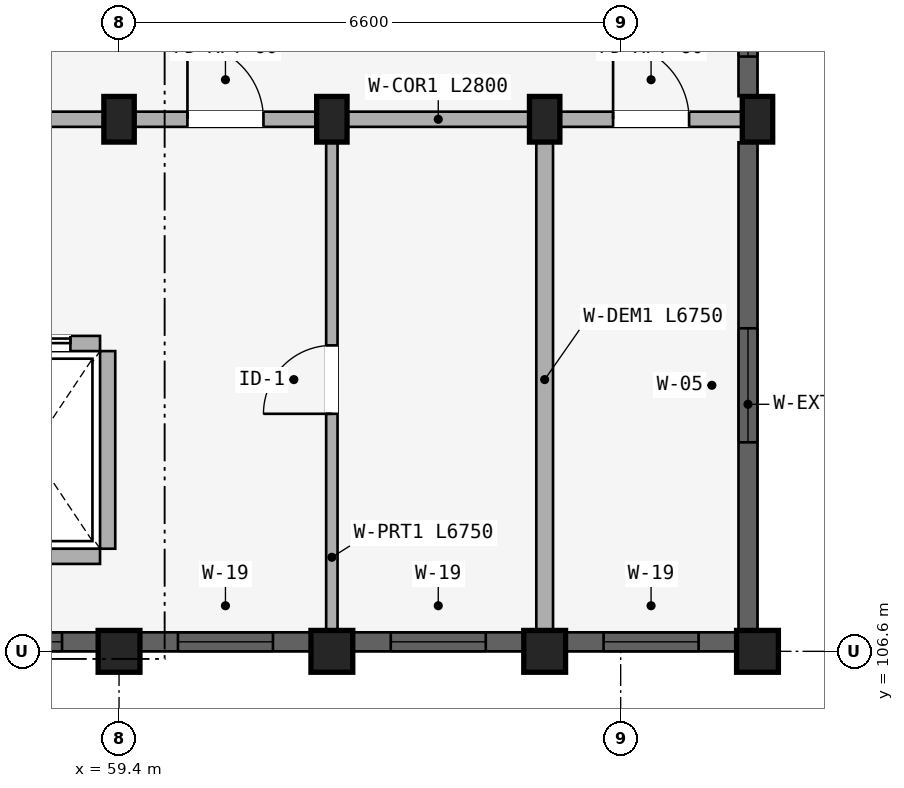
"""IFC4 building model, lengths in metres.
Left out: names, types, materials, properties, quantities, classifications, styles, units other than length and angle.
Written with IfcOpenShell. Run it as: python <this file> out.ifc"""

import sys

from ifc_helpers import new_model, si_unit, direction, frame, frame_2d, origin, origin_2d, place, context, subcontext, project, spatial, rectangle, extrude, element, fill, save


model = new_model("IFC4")
c1 = context("Model", 3, precision=1e-05, world=origin(), true_north=direction((0.0, 1.0)))
c2 = subcontext(c1, "Body", "Model", "MODEL_VIEW")
j1 = project(units=[si_unit("LENGTHUNIT", "METRE"), si_unit("PLANEANGLEUNIT", "RADIAN")], contexts=[c1])
p1 = place(None, origin())
s1 = spatial("IfcSite", under=j1, at=p1, CompositionType="ELEMENT")
p2 = place(p1, origin())
s2 = spatial("IfcBuilding", under=s1, at=p2, CompositionType="ELEMENT")
p3 = place(p2, frame((0.0, 0.0, 49.65)))
s3 = spatial("IfcBuildingStorey", under=s2, at=p3, CompositionType="ELEMENT", Elevation=49.65)
p4 = place(p3, frame((59.4, 106.6, 0.0), z_axis=(0.0, 0.0, 1.0), x_axis=(1.0, 0.0, 0.0)))
e1 = element("IfcColumn", 1, at=p4, inside=s3, PredefinedType="COLUMN", context=c2, shape_type="SweptSolid", body=[
    extrude(rectangle(XDim=0.55, YDim=0.55, at=origin_2d()), origin(), (0.0, 0.0, 1.0), 2.91),
])
p5 = place(p3, frame((59.4, 113.6, 0.0), z_axis=(0.0, 0.0, 1.0), x_axis=(1.0, 0.0, 0.0)))
e2 = element("IfcColumn", 2, at=p5, inside=s3, PredefinedType="COLUMN", context=c2, shape_type="SweptSolid", body=[
    extrude(rectangle(XDim=0.4, YDim=0.6, at=origin_2d()), origin(), (0.0, 0.0, 1.0), 2.91),
])
p6 = place(p3, frame((62.2, 106.6, 0.0), z_axis=(0.0, 0.0, 1.0), x_axis=(1.0, 0.0, 0.0)))
e3 = element("IfcColumn", 3, at=p6, inside=s3, PredefinedType="COLUMN", context=c2, shape_type="SweptSolid", body=[
    extrude(rectangle(XDim=0.55, YDim=0.55, at=origin_2d()), origin(), (0.0, 0.0, 1.0), 2.91),
])
p7 = place(p3, frame((62.2, 113.6, 0.0), z_axis=(0.0, 0.0, 1.0), x_axis=(1.0, 0.0, 0.0)))
e4 = element("IfcColumn", 4, at=p7, inside=s3, PredefinedType="COLUMN", context=c2, shape_type="SweptSolid", body=[
    extrude(rectangle(XDim=0.4, YDim=0.6, at=origin_2d()), origin(), (0.0, 0.0, 1.0), 2.91),
])
p8 = place(p3, frame((65.0, 106.6, 0.0), z_axis=(0.0, 0.0, 1.0), x_axis=(1.0, 0.0, 0.0)))
e5 = element("IfcColumn", 5, at=p8, inside=s3, PredefinedType="COLUMN", context=c2, shape_type="SweptSolid", body=[
    extrude(rectangle(XDim=0.55, YDim=0.55, at=origin_2d()), origin(), (0.0, 0.0, 1.0), 2.91),
])
p9 = place(p3, frame((65.0, 113.6, 0.0), z_axis=(0.0, 0.0, 1.0), x_axis=(1.0, 0.0, 0.0)))
e6 = element("IfcColumn", 6, at=p9, inside=s3, PredefinedType="COLUMN", context=c2, shape_type="SweptSolid", body=[
    extrude(rectangle(XDim=0.4, YDim=0.6, at=origin_2d()), origin(), (0.0, 0.0, 1.0), 2.91),
])
p10 = place(p3, frame((67.8, 106.6, 0.0), z_axis=(0.0, 0.0, 1.0), x_axis=(1.0, 0.0, 0.0)))
e7 = element("IfcColumn", 7, at=p10, inside=s3, PredefinedType="COLUMN", context=c2, shape_type="SweptSolid", body=[
    extrude(rectangle(XDim=0.55, YDim=0.55, at=origin_2d()), origin(), (0.0, 0.0, 1.0), 2.91),
])
p11 = place(p3, frame((67.8, 113.6, 0.0), z_axis=(0.0, 0.0, 1.0), x_axis=(1.0, 0.0, 0.0)))
e8 = element("IfcColumn", 8, at=p11, inside=s3, PredefinedType="COLUMN", context=c2, shape_type="SweptSolid", body=[
    extrude(rectangle(XDim=0.4, YDim=0.6, at=origin_2d()), origin(), (0.0, 0.0, 1.0), 2.91),
])
p12 = place(p3, frame((59.25, 107.95, 0.0), z_axis=(0.0, 0.0, 1.0), x_axis=(0.0, 1.0, 0.0)))
e9 = element("IfcWall", 9, at=p12, inside=s3, PredefinedType="STANDARD", context=c2, shape_type="SweptSolid", body=[
    extrude(rectangle(XDim=2.6, YDim=0.2, at=frame_2d((1.3, 0.0))), origin(), (0.0, 0.0, 1.0), 2.352),
])
p13 = place(p3, frame((57.35, 107.85, 0.0), z_axis=(0.0, 0.0, 1.0), x_axis=(1.0, 0.0, 0.0)))
e10 = element("IfcWall", 10, at=p13, inside=s3, PredefinedType="STANDARD", context=c2, shape_type="SweptSolid", body=[
    extrude(rectangle(XDim=1.8, YDim=0.2, at=frame_2d((0.9, 0.0))), origin(), (0.0, 0.0, 1.0), 2.91),
])
p14 = place(p3, frame((57.35, 110.65, 0.0), z_axis=(0.0, 0.0, 1.0), x_axis=(1.0, 0.0, 0.0)))
e11 = element("IfcWall", 11, at=p14, inside=s3, PredefinedType="STANDARD", context=c2, shape_type="SweptSolid", body=[
    extrude(rectangle(XDim=1.8, YDim=0.2, at=frame_2d((0.9, 0.0))), origin(), (0.0, 0.0, 1.0), 2.91),
])
p15 = place(p14, frame((0.39, 0.0, 0.0)))
e12 = element("IfcOpeningElement", 12, at=p15, cuts=e11, PredefinedType="OPENING", context=c2, shape_type="SweptSolid", body=[
    extrude(rectangle(XDim=1.02, YDim=2.15, at=frame_2d((0.51, 1.075))), frame((0.0, 0.11, 0.0), z_axis=(0.0, -1.0, 0.0), x_axis=(1.0, 0.0, 0.0)), (0.0, 0.0, 1.0), 0.22),
])
p16 = place(p3, frame((53.75, 113.6, 0.0), z_axis=(0.0, 0.0, 1.0), x_axis=(1.0, 0.0, 0.0)))
e13 = element("IfcWall", 13, at=p16, inside=s3, PredefinedType="STANDARD", context=c2, shape_type="SweptSolid", body=[
    extrude(rectangle(XDim=5.6, YDim=0.2, at=frame_2d((2.8, 0.0))), origin(), (0.0, 0.0, 1.0), 2.352),
])
p17 = place(p16, frame((1.91, 0.0, 0.0)))
e14 = element("IfcOpeningElement", 14, at=p17, cuts=e13, PredefinedType="OPENING", context=c2, shape_type="SweptSolid", body=[
    extrude(rectangle(XDim=1.22, YDim=2.15, at=frame_2d((0.61, 1.075))), frame((0.0, 0.11, 0.0), z_axis=(0.0, -1.0, 0.0), x_axis=(1.0, 0.0, 0.0)), (0.0, 0.0, 1.0), 0.22),
])
p18 = place(p3, frame((59.4, 113.6, 0.0), z_axis=(0.0, 0.0, 1.0), x_axis=(1.0, 0.0, 0.0)))
e15 = element("IfcWall", 15, at=p18, inside=s3, PredefinedType="STANDARD", context=c2, shape_type="SweptSolid", body=[
    extrude(rectangle(XDim=2.8, YDim=0.2, at=frame_2d((1.4, 0.0))), origin(), (0.0, 0.0, 1.0), 2.352),
])
p19 = place(p18, frame((0.9, 0.0, 0.0)))
e16 = element("IfcOpeningElement", 16, at=p19, cuts=e15, PredefinedType="OPENING", context=c2, shape_type="SweptSolid", body=[
    extrude(rectangle(XDim=1.0, YDim=2.15, at=frame_2d((0.5, 1.075))), frame((0.0, 0.11, 0.0), z_axis=(0.0, -1.0, 0.0), x_axis=(1.0, 0.0, 0.0)), (0.0, 0.0, 1.0), 0.22),
])
p20 = place(p3, frame((62.2, 113.6, 0.0), z_axis=(0.0, 0.0, 1.0), x_axis=(1.0, 0.0, 0.0)))
e17 = element("IfcWall", 17, at=p20, inside=s3, PredefinedType="STANDARD", context=c2, shape_type="SweptSolid", body=[
    extrude(rectangle(XDim=2.8, YDim=0.2, at=frame_2d((1.4, 0.0))), origin(), (0.0, 0.0, 1.0), 2.352),
])
p21 = place(p3, frame((65.0, 113.6, 0.0), z_axis=(0.0, 0.0, 1.0), x_axis=(1.0, 0.0, 0.0)))
e18 = element("IfcWall", 18, at=p21, inside=s3, PredefinedType="STANDARD", context=c2, shape_type="SweptSolid", body=[
    extrude(rectangle(XDim=2.8, YDim=0.2, at=frame_2d((1.4, 0.0))), origin(), (0.0, 0.0, 1.0), 2.352),
])
p22 = place(p21, frame((0.9, 0.0, 0.0)))
e19 = element("IfcOpeningElement", 19, at=p22, cuts=e18, PredefinedType="OPENING", context=c2, shape_type="SweptSolid", body=[
    extrude(rectangle(XDim=1.0, YDim=2.15, at=frame_2d((0.5, 1.075))), frame((0.0, 0.11, 0.0), z_axis=(0.0, -1.0, 0.0), x_axis=(1.0, 0.0, 0.0)), (0.0, 0.0, 1.0), 0.22),
])
p23 = place(p3, frame((62.2, 106.8, 0.0), z_axis=(0.0, 0.0, 1.0), x_axis=(0.0, 1.0, 0.0)))
e20 = element("IfcWall", 20, at=p23, inside=s3, PredefinedType="PARTITIONING", context=c2, shape_type="SweptSolid", body=[
    extrude(rectangle(XDim=6.75, YDim=0.15, at=frame_2d((3.375, 0.0))), origin(), (0.0, 0.0, 1.0), 2.352),
])
p24 = place(p23, frame((2.925, 0.0, 0.0)))
e21 = element("IfcOpeningElement", 21, at=p24, cuts=e20, PredefinedType="OPENING", context=c2, shape_type="SweptSolid", body=[
    extrude(rectangle(XDim=0.9, YDim=2.1, at=frame_2d((0.45, 1.05))), frame((0.0, 0.085, 0.0), z_axis=(0.0, -1.0, 0.0), x_axis=(1.0, 0.0, 0.0)), (0.0, 0.0, 1.0), 0.17),
])
p25 = place(p3, frame((65.0, 106.8, 0.0), z_axis=(0.0, 0.0, 1.0), x_axis=(0.0, 1.0, 0.0)))
e22 = element("IfcWall", 22, at=p25, inside=s3, PredefinedType="STANDARD", context=c2, shape_type="SweptSolid", body=[
    extrude(rectangle(XDim=6.75, YDim=0.22, at=frame_2d((3.375, 0.0))), origin(), (0.0, 0.0, 1.0), 2.352),
])
p26 = place(p3, frame((56.628, 106.725, 0.0), z_axis=(0.0, 0.0, 1.0), x_axis=(1.0, 0.0, 0.0)))
e23 = element("IfcWall", 23, at=p26, inside=s3, PredefinedType="STANDARD", context=c2, shape_type="SweptSolid", body=[
    extrude(rectangle(XDim=2.493, YDim=0.25, at=frame_2d((1.247, 0.0))), origin(), (0.0, 0.0, 1.0), 2.452),
])
p27 = place(p26, frame((0.822, 0.0, 0.752)))
e24 = element("IfcOpeningElement", 24, at=p27, cuts=e23, PredefinedType="OPENING", context=c2, shape_type="SweptSolid", body=[
    extrude(rectangle(XDim=1.2, YDim=1.5, at=frame_2d((0.6, 0.75))), frame((0.0, 0.135, 0.0), z_axis=(0.0, -1.0, 0.0), x_axis=(1.0, 0.0, 0.0)), (0.0, 0.0, 1.0), 0.27),
])
p28 = place(p3, frame((59.678, 106.725, 0.0), z_axis=(0.0, 0.0, 1.0), x_axis=(1.0, 0.0, 0.0)))
e25 = element("IfcWall", 25, at=p28, inside=s3, PredefinedType="STANDARD", context=c2, shape_type="SweptSolid", body=[
    extrude(rectangle(XDim=2.243, YDim=0.25, at=frame_2d((1.122, 0.0))), origin(), (0.0, 0.0, 1.0), 2.452),
])
p29 = place(p28, frame((0.497, 0.0, 0.702)))
e26 = element("IfcOpeningElement", 26, at=p29, cuts=e25, PredefinedType="OPENING", context=c2, shape_type="SweptSolid", body=[
    extrude(rectangle(XDim=1.25, YDim=1.55, at=frame_2d((0.625, 0.775))), frame((0.0, 0.135, 0.0), z_axis=(0.0, -1.0, 0.0), x_axis=(1.0, 0.0, 0.0)), (0.0, 0.0, 1.0), 0.27),
])
p30 = place(p3, frame((62.479, 106.725, 0.0), z_axis=(0.0, 0.0, 1.0), x_axis=(1.0, 0.0, 0.0)))
e27 = element("IfcWall", 27, at=p30, inside=s3, PredefinedType="STANDARD", context=c2, shape_type="SweptSolid", body=[
    extrude(rectangle(XDim=2.243, YDim=0.25, at=frame_2d((1.122, 0.0))), origin(), (0.0, 0.0, 1.0), 2.452),
])
p31 = place(p30, frame((0.497, 0.0, 0.702)))
e28 = element("IfcOpeningElement", 28, at=p31, cuts=e27, PredefinedType="OPENING", context=c2, shape_type="SweptSolid", body=[
    extrude(rectangle(XDim=1.25, YDim=1.55, at=frame_2d((0.625, 0.775))), frame((0.0, 0.135, 0.0), z_axis=(0.0, -1.0, 0.0), x_axis=(1.0, 0.0, 0.0)), (0.0, 0.0, 1.0), 0.27),
])
p32 = place(p3, frame((65.279, 106.725, 0.0), z_axis=(0.0, 0.0, 1.0), x_axis=(1.0, 0.0, 0.0)))
e29 = element("IfcWall", 29, at=p32, inside=s3, PredefinedType="STANDARD", context=c2, shape_type="SweptSolid", body=[
    extrude(rectangle(XDim=2.243, YDim=0.25, at=frame_2d((1.122, 0.0))), origin(), (0.0, 0.0, 1.0), 2.452),
])
p33 = place(p32, frame((0.497, 0.0, 0.702)))
e30 = element("IfcOpeningElement", 30, at=p33, cuts=e29, PredefinedType="OPENING", context=c2, shape_type="SweptSolid", body=[
    extrude(rectangle(XDim=1.25, YDim=1.55, at=frame_2d((0.625, 0.775))), frame((0.0, 0.135, 0.0), z_axis=(0.0, -1.0, 0.0), x_axis=(1.0, 0.0, 0.0)), (0.0, 0.0, 1.0), 0.27),
])
p34 = place(p3, frame((67.675, 106.878, 0.0), z_axis=(0.0, 0.0, 1.0), x_axis=(0.0, 1.0, 0.0)))
e31 = element("IfcWall", 31, at=p34, inside=s3, PredefinedType="STANDARD", context=c2, shape_type="SweptSolid", body=[
    extrude(rectangle(XDim=6.418, YDim=0.25, at=frame_2d((3.209, 0.0))), origin(), (0.0, 0.0, 1.0), 2.352),
])
p35 = place(p34, frame((2.471, 0.0, 0.502)))
e32 = element("IfcOpeningElement", 32, at=p35, cuts=e31, PredefinedType="OPENING", context=c2, shape_type="SweptSolid", body=[
    extrude(rectangle(XDim=1.5, YDim=1.65, at=frame_2d((0.75, 0.825))), frame((0.0, 0.135, 0.0), z_axis=(0.0, -1.0, 0.0), x_axis=(1.0, 0.0, 0.0)), (0.0, 0.0, 1.0), 0.27),
])
p36 = place(p3, frame((67.675, 113.904, 0.0), z_axis=(0.0, 0.0, 1.0), x_axis=(0.0, 1.0, 0.0)))
e33 = element("IfcWall", 33, at=p36, inside=s3, PredefinedType="STANDARD", context=c2, shape_type="SweptSolid", body=[
    extrude(rectangle(XDim=1.793, YDim=0.25, at=frame_2d((0.896, 0.0))), origin(), (0.0, 0.0, 1.0), 2.352),
])
p37 = place(p36, frame((0.521, 0.0, 0.88)))
e34 = element("IfcOpeningElement", 34, at=p37, cuts=e33, PredefinedType="OPENING", context=c2, shape_type="SweptSolid", body=[
    extrude(rectangle(XDim=0.75, YDim=1.05, at=frame_2d((0.375, 0.525))), frame((0.0, 0.135, 0.0), z_axis=(0.0, -1.0, 0.0), x_axis=(1.0, 0.0, 0.0)), (0.0, 0.0, 1.0), 0.27),
])
p38 = place(p27, origin())
e35 = element("IfcWindow", 35, at=p38, inside=s3, PartitioningType="SINGLE_PANEL", PredefinedType="WINDOW", context=c2, shape_type="SweptSolid", body=[
    extrude(rectangle(XDim=1.2, YDim=1.5, at=frame_2d((0.6, 0.75))), frame((0.0, 0.03, 0.0), z_axis=(0.0, -1.0, 0.0), x_axis=(1.0, 0.0, 0.0)), (0.0, 0.0, 1.0), 0.06),
])
fill(e24, e35)
p39 = place(p29, origin())
e36 = element("IfcWindow", 36, at=p39, inside=s3, PartitioningType="SINGLE_PANEL", PredefinedType="WINDOW", context=c2, shape_type="SweptSolid", body=[
    extrude(rectangle(XDim=1.25, YDim=1.55, at=frame_2d((0.625, 0.775))), frame((0.0, 0.03, 0.0), z_axis=(0.0, -1.0, 0.0), x_axis=(1.0, 0.0, 0.0)), (0.0, 0.0, 1.0), 0.06),
])
fill(e26, e36)
p40 = place(p31, origin())
e37 = element("IfcWindow", 37, at=p40, inside=s3, PartitioningType="SINGLE_PANEL", PredefinedType="WINDOW", context=c2, shape_type="SweptSolid", body=[
    extrude(rectangle(XDim=1.25, YDim=1.55, at=frame_2d((0.625, 0.775))), frame((0.0, 0.03, 0.0), z_axis=(0.0, -1.0, 0.0), x_axis=(1.0, 0.0, 0.0)), (0.0, 0.0, 1.0), 0.06),
])
fill(e28, e37)
p41 = place(p33, origin())
e38 = element("IfcWindow", 38, at=p41, inside=s3, PartitioningType="SINGLE_PANEL", PredefinedType="WINDOW", context=c2, shape_type="SweptSolid", body=[
    extrude(rectangle(XDim=1.25, YDim=1.55, at=frame_2d((0.625, 0.775))), frame((0.0, 0.03, 0.0), z_axis=(0.0, -1.0, 0.0), x_axis=(1.0, 0.0, 0.0)), (0.0, 0.0, 1.0), 0.06),
])
fill(e30, e38)
p42 = place(p35, origin())
e39 = element("IfcWindow", 39, at=p42, inside=s3, PartitioningType="DOUBLE_PANEL_VERTICAL", PredefinedType="WINDOW", context=c2, shape_type="SweptSolid", body=[
    extrude(rectangle(XDim=1.5, YDim=1.65, at=frame_2d((0.75, 0.825))), frame((0.0, 0.03, 0.0), z_axis=(0.0, -1.0, 0.0), x_axis=(1.0, 0.0, 0.0)), (0.0, 0.0, 1.0), 0.06),
])
fill(e32, e39)
p43 = place(p37, origin())
e40 = element("IfcWindow", 40, at=p43, inside=s3, PartitioningType="SINGLE_PANEL", PredefinedType="WINDOW", context=c2, shape_type="SweptSolid", body=[
    extrude(rectangle(XDim=0.75, YDim=1.05, at=frame_2d((0.375, 0.525))), frame((0.0, 0.03, 0.0), z_axis=(0.0, -1.0, 0.0), x_axis=(1.0, 0.0, 0.0)), (0.0, 0.0, 1.0), 0.06),
])
fill(e34, e40)
p44 = place(p15, origin())
e41 = element("IfcDoor", 41, at=p44, inside=s3, OperationType="SLIDING_TO_RIGHT", PredefinedType="DOOR", context=c2, shape_type="SweptSolid", body=[
    extrude(rectangle(XDim=1.02, YDim=2.15, at=frame_2d((0.51, 1.075))), frame((0.0, 0.025, 0.0), z_axis=(0.0, -1.0, 0.0), x_axis=(1.0, 0.0, 0.0)), (0.0, 0.0, 1.0), 0.05),
])
fill(e12, e41)
p45 = place(p19, frame((1.0, 0.0, 0.0), z_axis=(0.0, 0.0, 1.0), x_axis=(-1.0, 0.0, 0.0)))
e42 = element("IfcDoor", 42, at=p45, inside=s3, OperationType="SINGLE_SWING_RIGHT", PredefinedType="DOOR", context=c2, shape_type="SweptSolid", body=[
    extrude(rectangle(XDim=1.0, YDim=2.15, at=frame_2d((0.5, 1.075))), frame((0.0, 0.025, 0.0), z_axis=(0.0, -1.0, 0.0), x_axis=(1.0, 0.0, 0.0)), (0.0, 0.0, 1.0), 0.05),
])
fill(e16, e42)
p46 = place(p22, frame((1.0, 0.0, 0.0), z_axis=(0.0, 0.0, 1.0), x_axis=(-1.0, 0.0, 0.0)))
e43 = element("IfcDoor", 43, at=p46, inside=s3, OperationType="SINGLE_SWING_RIGHT", PredefinedType="DOOR", context=c2, shape_type="SweptSolid", body=[
    extrude(rectangle(XDim=1.0, YDim=2.15, at=frame_2d((0.5, 1.075))), frame((0.0, 0.025, 0.0), z_axis=(0.0, -1.0, 0.0), x_axis=(1.0, 0.0, 0.0)), (0.0, 0.0, 1.0), 0.05),
])
fill(e19, e43)
p47 = place(p24, frame((0.9, 0.0, 0.0), z_axis=(0.0, 0.0, 1.0), x_axis=(-1.0, 0.0, 0.0)))
e44 = element("IfcDoor", 44, at=p47, inside=s3, OperationType="SINGLE_SWING_RIGHT", PredefinedType="DOOR", context=c2, shape_type="SweptSolid", body=[
    extrude(rectangle(XDim=0.9, YDim=2.1, at=frame_2d((0.45, 1.05))), frame((0.0, 0.025, 0.0), z_axis=(0.0, -1.0, 0.0), x_axis=(1.0, 0.0, 0.0)), (0.0, 0.0, 1.0), 0.05),
])
fill(e21, e44)
save(model, sys.argv[1])
